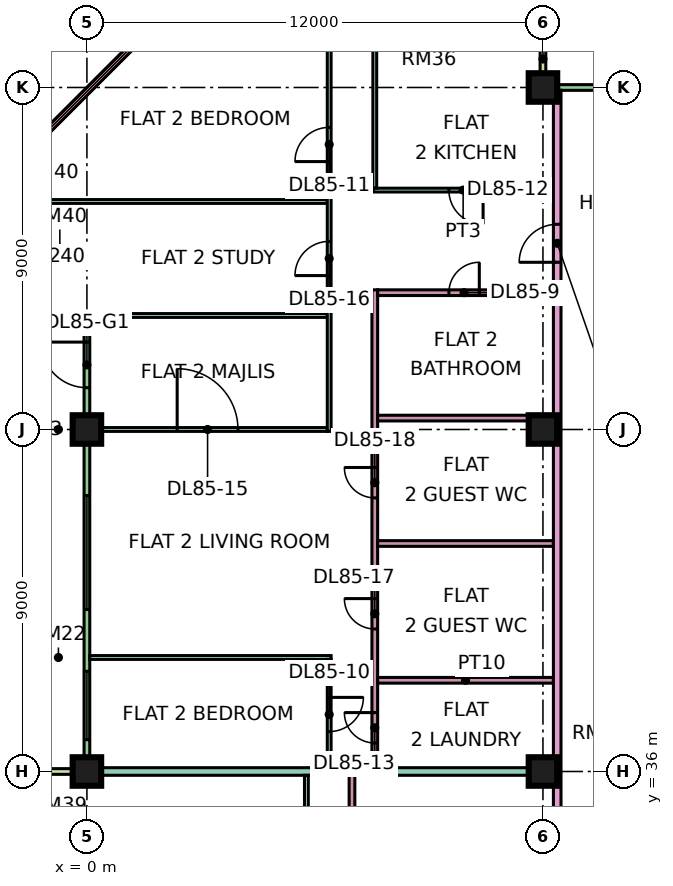
"""IFC4 building model, lengths in metres.
Left out: names, types, materials, properties, quantities, classifications, styles, units other than length and angle.
Written with IfcOpenShell. Run it as: python <this file> out.ifc"""

import sys

from ifc_helpers import new_model, si_unit, direction, frame, frame_2d, origin, origin_2d, place, context, subcontext, project, spatial, rectangle, extrude, element, fill, save


model = new_model("IFC4")
c1 = context("Model", 3, precision=1e-05, world=origin(), true_north=direction((0.0, 1.0)))
c2 = subcontext(c1, "Body", "Model", "MODEL_VIEW")
j1 = project(units=[si_unit("LENGTHUNIT", "METRE"), si_unit("PLANEANGLEUNIT", "RADIAN")], contexts=[c1])
p1 = place(None, origin())
s1 = spatial("IfcSite", under=j1, at=p1, CompositionType="ELEMENT")
p2 = place(p1, origin())
s2 = spatial("IfcBuilding", under=s1, at=p2, CompositionType="ELEMENT")
p3 = place(p2, frame((0.0, 0.0, 365.15)))
s3 = spatial("IfcBuildingStorey", under=s2, at=p3, CompositionType="ELEMENT", Elevation=365.15)
p4 = place(p3, frame((0.0, 36.0, 0.0), z_axis=(0.0, 0.0, 1.0), x_axis=(1.0, 0.0, 0.0)))
e1 = element("IfcColumn", 1, at=p4, inside=s3, PredefinedType="COLUMN", context=c2, shape_type="SweptSolid", body=[
    extrude(rectangle(XDim=0.75, YDim=0.75, at=origin_2d()), origin(), (0.0, 0.0, 1.0), 3.75),
])
for number, where, z_axis, x_axis in (
    (2, (0.0, 45.0, 0.0), (0.0, 0.0, 1.0), (1.0, 0.0, 0.0)),
    (3, (12.0, 36.0, 0.0), (0.0, 0.0, 1.0), (1.0, 0.0, 0.0)),
    (4, (12.0, 45.0, 0.0), (0.0, 0.0, 1.0), (1.0, 0.0, 0.0)),
    (5, (12.0, 54.0, 0.0), (0.0, 0.0, 1.0), (1.0, 0.0, 0.0)),
):
    element("IfcColumn", number, at=place(p3, frame(where, z_axis=z_axis, x_axis=x_axis)), inside=s3, PredefinedType="COLUMN", context=c2, shape_type="SweptSolid", body=[
        extrude(rectangle(XDim=0.75, YDim=0.75, at=origin_2d()), origin(), (0.0, 0.0, 1.0), 3.75),
    ])
p5 = place(p3, frame((22.425, 54.0, 0.0), z_axis=(0.0, 0.0, 1.0), x_axis=(-1.0, 0.0, 0.0)))
e6 = element("IfcWall", 6, at=p5, inside=s3, PredefinedType="SOLIDWALL", context=c2, shape_type="SweptSolid", body=[
    extrude(rectangle(XDim=10.35, YDim=0.15, at=frame_2d((5.175, 0.0))), origin(), (0.0, 0.0, 1.0), 3.35),
])
p6 = place(p5, frame((1.012, 0.0, 0.45)))
e7 = element("IfcOpeningElement", 7, at=p6, cuts=e6, PredefinedType="OPENING", context=c2, shape_type="SweptSolid", body=[
    extrude(rectangle(XDim=4.8, YDim=2.4, at=frame_2d((2.4, 1.2))), frame((0.0, 0.085, 0.0), z_axis=(0.0, -1.0, 0.0), x_axis=(1.0, 0.0, 0.0)), (0.0, 0.0, 1.0), 0.17),
])
p7 = place(p3, frame((12.0, 55.5, 0.0), z_axis=(0.0, 0.0, 1.0), x_axis=(0.0, -1.0, 0.0)))
e8 = element("IfcWall", 8, at=p7, inside=s3, PredefinedType="SOLIDWALL", context=c2, shape_type="SweptSolid", body=[
    extrude(rectangle(XDim=1.5, YDim=0.15, at=frame_2d((0.75, 0.0))), origin(), (0.0, 0.0, 1.0), 3.35),
])
p8 = place(p3, frame((1.553, 55.447, 0.0), z_axis=(0.0, 0.0, 1.0), x_axis=(-0.707106781187, -0.707106781187, 0.0)))
e9 = element("IfcWall", 9, at=p8, inside=s3, PredefinedType="SOLIDWALL", context=c2, shape_type="SweptSolid", body=[
    extrude(rectangle(XDim=4.243, YDim=0.15, at=frame_2d((2.121, 0.0))), origin(), (0.0, 0.0, 1.0), 3.35),
])
p9 = place(p8, frame((0.621, 0.0, 0.45)))
e10 = element("IfcOpeningElement", 10, at=p9, cuts=e9, PredefinedType="OPENING", context=c2, shape_type="SweptSolid", body=[
    extrude(rectangle(XDim=3.0, YDim=2.4, at=frame_2d((1.5, 1.2))), frame((0.0, 0.085, 0.0), z_axis=(0.0, -1.0, 0.0), x_axis=(1.0, 0.0, 0.0)), (0.0, 0.0, 1.0), 0.17),
])
p10 = place(p3, frame((0.0, 47.925, 0.0), z_axis=(0.0, 0.0, 1.0), x_axis=(0.0, -1.0, 0.0)))
e11 = element("IfcWall", 11, at=p10, inside=s3, PredefinedType="SOLIDWALL", context=c2, shape_type="SweptSolid", body=[
    extrude(rectangle(XDim=11.85, YDim=0.15, at=frame_2d((5.925, 0.0))), origin(), (0.0, 0.0, 1.0), 3.35),
])
p11 = place(p10, frame((0.625, 0.0, 0.0)))
e12 = element("IfcOpeningElement", 12, at=p11, cuts=e11, PredefinedType="OPENING", context=c2, shape_type="SweptSolid", body=[
    extrude(rectangle(XDim=1.2, YDim=2.4, at=frame_2d((0.6, 1.2))), frame((0.0, 0.085, 0.0), z_axis=(0.0, -1.0, 0.0), x_axis=(1.0, 0.0, 0.0)), (0.0, 0.0, 1.0), 0.17),
])
p12 = place(p10, frame((4.663, 0.0, 0.45)))
e13 = element("IfcOpeningElement", 13, at=p12, cuts=e11, PredefinedType="OPENING", context=c2, shape_type="SweptSolid", body=[
    extrude(rectangle(XDim=3.0, YDim=2.4, at=frame_2d((1.5, 1.2))), frame((0.0, 0.085, 0.0), z_axis=(0.0, -1.0, 0.0), x_axis=(1.0, 0.0, 0.0)), (0.0, 0.0, 1.0), 0.17),
])
p13 = place(p10, frame((9.288, 0.0, 0.45)))
e14 = element("IfcOpeningElement", 14, at=p13, cuts=e11, PredefinedType="OPENING", context=c2, shape_type="SweptSolid", body=[
    extrude(rectangle(XDim=1.8, YDim=2.4, at=frame_2d((0.9, 1.2))), frame((0.0, 0.085, 0.0), z_axis=(0.0, -1.0, 0.0), x_axis=(1.0, 0.0, 0.0)), (0.0, 0.0, 1.0), 0.17),
])
for number, where, z_axis, x_axis in (
    (15, (-1.5, 48.0, 0.0), (0.0, 0.0, 1.0), (1.0, 0.0, 0.0)),
    (16, (-1.5, 36.0, 0.0), (0.0, 0.0, 1.0), (1.0, 0.0, 0.0)),
):
    element("IfcWall", number, at=place(p3, frame(where, z_axis=z_axis, x_axis=x_axis)), inside=s3, PredefinedType="SOLIDWALL", context=c2, shape_type="SweptSolid", body=[
        extrude(rectangle(XDim=1.5, YDim=0.15, at=frame_2d((0.75, 0.0))), origin(), (0.0, 0.0, 1.0), 3.35),
    ])
e17 = element("IfcWall", 17, at=p4, inside=s3, PredefinedType="PARTITIONING", context=c2, shape_type="SweptSolid", body=[
    extrude(rectangle(XDim=12.275, YDim=0.2, at=frame_2d((6.137, 0.0))), origin(), (0.0, 0.0, 1.0), 3.35),
])
p14 = place(p3, frame((0.0, 48.0, 0.0), z_axis=(0.0, 0.0, 1.0), x_axis=(1.0, 0.0, 0.0)))
e18 = element("IfcWall", 18, at=p14, inside=s3, PredefinedType="PARTITIONING", context=c2, shape_type="SweptSolid", body=[
    extrude(rectangle(XDim=6.325, YDim=0.1, at=frame_2d((3.163, 0.0))), origin(), (0.0, 0.0, 1.0), 3.35),
])
p15 = place(p3, frame((-1.35, 51.0, 0.0), z_axis=(0.0, 0.0, 1.0), x_axis=(1.0, 0.0, 0.0)))
e19 = element("IfcWall", 19, at=p15, inside=s3, PredefinedType="PARTITIONING", context=c2, shape_type="SweptSolid", body=[
    extrude(rectangle(XDim=7.675, YDim=0.1, at=frame_2d((3.837, 0.0))), origin(), (0.0, 0.0, 1.0), 3.35),
])
p16 = place(p3, frame((0.074, 39.0, 0.0), z_axis=(0.0, 0.0, 1.0), x_axis=(1.0, 0.0, 0.0)))
e20 = element("IfcWall", 20, at=p16, inside=s3, PredefinedType="PARTITIONING", context=c2, shape_type="SweptSolid", body=[
    extrude(rectangle(XDim=6.351, YDim=0.1, at=frame_2d((3.176, 0.0))), origin(), (0.0, 0.0, 1.0), 3.35),
])
p17 = place(p3, frame((0.074, 45.0, 0.0), z_axis=(0.0, 0.0, 1.0), x_axis=(1.0, 0.0, 0.0)))
e21 = element("IfcWall", 21, at=p17, inside=s3, PredefinedType="PARTITIONING", context=c2, shape_type="SweptSolid", body=[
    extrude(rectangle(XDim=6.251, YDim=0.1, at=frame_2d((3.125, 0.0))), origin(), (0.0, 0.0, 1.0), 3.35),
])
p18 = place(p17, frame((2.301, 0.0, 0.0)))
e22 = element("IfcOpeningElement", 22, at=p18, cuts=e21, PredefinedType="OPENING", context=c2, shape_type="SweptSolid", body=[
    extrude(rectangle(XDim=1.6, YDim=2.1, at=frame_2d((0.8, 1.05))), frame((0.0, 0.06, 0.0), z_axis=(0.0, -1.0, 0.0), x_axis=(1.0, 0.0, 0.0)), (0.0, 0.0, 1.0), 0.12),
])
p19 = place(p3, frame((5.775, 29.95, 0.0), z_axis=(0.0, 0.0, 1.0), x_axis=(0.0, 1.0, 0.0)))
e23 = element("IfcWall", 23, at=p19, inside=s3, PredefinedType="PARTITIONING", context=c2, shape_type="SweptSolid", body=[
    extrude(rectangle(XDim=5.95, YDim=0.1, at=frame_2d((2.975, 0.0))), origin(), (0.0, 0.0, 1.0), 3.35),
])
p20 = place(p19, frame((1.1, 0.0, 0.0)))
e24 = element("IfcOpeningElement", 24, at=p20, cuts=e23, PredefinedType="OPENING", context=c2, shape_type="SweptSolid", body=[
    extrude(rectangle(XDim=0.9, YDim=2.1, at=frame_2d((0.45, 1.05))), frame((0.0, 0.06, 0.0), z_axis=(0.0, -1.0, 0.0), x_axis=(1.0, 0.0, 0.0)), (0.0, 0.0, 1.0), 0.12),
])
p21 = place(p19, frame((4.1, 0.0, 0.0)))
e25 = element("IfcOpeningElement", 25, at=p21, cuts=e23, PredefinedType="OPENING", context=c2, shape_type="SweptSolid", body=[
    extrude(rectangle(XDim=0.9, YDim=2.1, at=frame_2d((0.45, 1.05))), frame((0.0, 0.06, 0.0), z_axis=(0.0, -1.0, 0.0), x_axis=(1.0, 0.0, 0.0)), (0.0, 0.0, 1.0), 0.12),
])
p22 = place(p3, frame((6.375, 36.1, 0.0), z_axis=(0.0, 0.0, 1.0), x_axis=(0.0, 1.0, 0.0)))
e26 = element("IfcWall", 26, at=p22, inside=s3, PredefinedType="PARTITIONING", context=c2, shape_type="SweptSolid", body=[
    extrude(rectangle(XDim=2.85, YDim=0.1, at=frame_2d((1.425, 0.0))), origin(), (0.0, 0.0, 1.0), 3.35),
])
p23 = place(p22, frame((0.95, 0.0, 0.0)))
e27 = element("IfcOpeningElement", 27, at=p23, cuts=e26, PredefinedType="OPENING", context=c2, shape_type="SweptSolid", body=[
    extrude(rectangle(XDim=0.9, YDim=2.1, at=frame_2d((0.45, 1.05))), frame((0.0, 0.06, 0.0), z_axis=(0.0, -1.0, 0.0), x_axis=(1.0, 0.0, 0.0)), (0.0, 0.0, 1.0), 0.12),
])
p24 = place(p3, frame((6.375, 44.95, 0.0), z_axis=(0.0, 0.0, 1.0), x_axis=(0.0, 1.0, 0.0)))
e28 = element("IfcWall", 28, at=p24, inside=s3, PredefinedType="PARTITIONING", context=c2, shape_type="SweptSolid", body=[
    extrude(rectangle(XDim=10.4, YDim=0.1, at=frame_2d((5.2, 0.0))), origin(), (0.0, 0.0, 1.0), 3.35),
])
p25 = place(p24, frame((7.1, 0.0, 0.0)))
e29 = element("IfcOpeningElement", 29, at=p25, cuts=e28, PredefinedType="OPENING", context=c2, shape_type="SweptSolid", body=[
    extrude(rectangle(XDim=0.9, YDim=2.1, at=frame_2d((0.45, 1.05))), frame((0.0, 0.06, 0.0), z_axis=(0.0, -1.0, 0.0), x_axis=(1.0, 0.0, 0.0)), (0.0, 0.0, 1.0), 0.12),
])
p26 = place(p24, frame((4.1, 0.0, 0.0)))
e30 = element("IfcOpeningElement", 30, at=p26, cuts=e28, PredefinedType="OPENING", context=c2, shape_type="SweptSolid", body=[
    extrude(rectangle(XDim=0.9, YDim=2.1, at=frame_2d((0.45, 1.05))), frame((0.0, 0.06, 0.0), z_axis=(0.0, -1.0, 0.0), x_axis=(1.0, 0.0, 0.0)), (0.0, 0.0, 1.0), 0.12),
])
p27 = place(p3, frame((6.975, 26.325, 0.0), z_axis=(0.0, 0.0, 1.0), x_axis=(0.0, 1.0, 0.0)))
e31 = element("IfcWall", 31, at=p27, inside=s3, PredefinedType="PARTITIONING", context=c2, shape_type="SweptSolid", body=[
    extrude(rectangle(XDim=9.575, YDim=0.15, at=frame_2d((4.788, 0.0))), origin(), (0.0, 0.0, 1.0), 3.35),
])
p28 = place(p27, frame((1.125, 0.0, 0.0)))
e32 = element("IfcOpeningElement", 32, at=p28, cuts=e31, PredefinedType="OPENING", context=c2, shape_type="SweptSolid", body=[
    extrude(rectangle(XDim=0.8, YDim=2.1, at=frame_2d((0.4, 1.05))), frame((0.0, 0.085, 0.0), z_axis=(0.0, -1.0, 0.0), x_axis=(1.0, 0.0, 0.0)), (0.0, 0.0, 1.0), 0.17),
])
p29 = place(p27, frame((5.925, 0.0, 0.0)))
e33 = element("IfcOpeningElement", 33, at=p29, cuts=e31, PredefinedType="OPENING", context=c2, shape_type="SweptSolid", body=[
    extrude(rectangle(XDim=0.9, YDim=2.1, at=frame_2d((0.45, 1.05))), frame((0.0, 0.085, 0.0), z_axis=(0.0, -1.0, 0.0), x_axis=(1.0, 0.0, 0.0)), (0.0, 0.0, 1.0), 0.17),
])
p30 = place(p3, frame((7.525, 51.3, 0.0), z_axis=(0.0, 0.0, 1.0), x_axis=(1.0, 0.0, 0.0)))
e34 = element("IfcWall", 34, at=p30, inside=s3, PredefinedType="PARTITIONING", context=c2, shape_type="SweptSolid", body=[
    extrude(rectangle(XDim=4.75, YDim=0.1, at=frame_2d((2.375, 0.0))), origin(), (0.0, 0.0, 1.0), 3.35),
])
p31 = place(p30, frame((2.0, 0.0, 0.0)))
e35 = element("IfcOpeningElement", 35, at=p31, cuts=e34, PredefinedType="OPENING", context=c2, shape_type="SweptSolid", body=[
    extrude(rectangle(XDim=0.9, YDim=2.1, at=frame_2d((0.45, 1.05))), frame((0.0, 0.06, 0.0), z_axis=(0.0, -1.0, 0.0), x_axis=(1.0, 0.0, 0.0)), (0.0, 0.0, 1.0), 0.12),
])
p32 = place(p3, frame((7.575, 36.1, 0.0), z_axis=(0.0, 0.0, 1.0), x_axis=(0.0, 1.0, 0.0)))
e36 = element("IfcWall", 36, at=p32, inside=s3, PredefinedType="PARTITIONING", context=c2, shape_type="SweptSolid", body=[
    extrude(rectangle(XDim=12.575, YDim=0.15, at=frame_2d((6.288, 0.0))), origin(), (0.0, 0.0, 1.0), 3.35),
])
p33 = place(p32, frame((0.65, 0.0, 0.0)))
e37 = element("IfcOpeningElement", 37, at=p33, cuts=e36, PredefinedType="OPENING", context=c2, shape_type="SweptSolid", body=[
    extrude(rectangle(XDim=0.8, YDim=2.1, at=frame_2d((0.4, 1.05))), frame((0.0, 0.085, 0.0), z_axis=(0.0, -1.0, 0.0), x_axis=(1.0, 0.0, 0.0)), (0.0, 0.0, 1.0), 0.17),
])
p34 = place(p32, frame((3.65, 0.0, 0.0)))
e38 = element("IfcOpeningElement", 38, at=p34, cuts=e36, PredefinedType="OPENING", context=c2, shape_type="SweptSolid", body=[
    extrude(rectangle(XDim=0.8, YDim=2.1, at=frame_2d((0.4, 1.05))), frame((0.0, 0.085, 0.0), z_axis=(0.0, -1.0, 0.0), x_axis=(1.0, 0.0, 0.0)), (0.0, 0.0, 1.0), 0.17),
])
p35 = place(p32, frame((7.1, 0.0, 0.0)))
e39 = element("IfcOpeningElement", 39, at=p35, cuts=e36, PredefinedType="OPENING", context=c2, shape_type="SweptSolid", body=[
    extrude(rectangle(XDim=0.8, YDim=2.1, at=frame_2d((0.4, 1.05))), frame((0.0, 0.085, 0.0), z_axis=(0.0, -1.0, 0.0), x_axis=(1.0, 0.0, 0.0)), (0.0, 0.0, 1.0), 0.17),
])
p36 = place(p3, frame((7.575, 51.35, 0.0), z_axis=(0.0, 0.0, 1.0), x_axis=(0.0, 1.0, 0.0)))
e40 = element("IfcWall", 40, at=p36, inside=s3, PredefinedType="PARTITIONING", context=c2, shape_type="SweptSolid", body=[
    extrude(rectangle(XDim=4.0, YDim=0.1, at=frame_2d((2.0, 0.0))), origin(), (0.0, 0.0, 1.0), 3.35),
])
for number, where, z_axis, x_axis in (
    (41, (7.65, 38.4, 0.0), (0.0, 0.0, 1.0), (1.0, 0.0, 0.0)),
    (42, (7.65, 42.0, 0.0), (0.0, 0.0, 1.0), (1.0, 0.0, 0.0)),
    (43, (7.65, 45.3, 0.0), (0.0, 0.0, 1.0), (1.0, 0.0, 0.0)),
):
    element("IfcWall", number, at=place(p3, frame(where, z_axis=z_axis, x_axis=x_axis)), inside=s3, PredefinedType="PARTITIONING", context=c2, shape_type="SweptSolid", body=[
        extrude(rectangle(XDim=4.625, YDim=0.15, at=frame_2d((2.312, 0.0))), origin(), (0.0, 0.0, 1.0), 3.35),
    ])
p37 = place(p3, frame((7.65, 48.6, 0.0), z_axis=(0.0, 0.0, 1.0), x_axis=(1.0, 0.0, 0.0)))
e44 = element("IfcWall", 44, at=p37, inside=s3, PredefinedType="PARTITIONING", context=c2, shape_type="SweptSolid", body=[
    extrude(rectangle(XDim=4.625, YDim=0.15, at=frame_2d((2.312, 0.0))), origin(), (0.0, 0.0, 1.0), 3.35),
])
p38 = place(p37, frame((1.875, 0.0, 0.0)))
e45 = element("IfcOpeningElement", 45, at=p38, cuts=e44, PredefinedType="OPENING", context=c2, shape_type="SweptSolid", body=[
    extrude(rectangle(XDim=0.8, YDim=2.1, at=frame_2d((0.4, 1.05))), frame((0.0, 0.085, 0.0), z_axis=(0.0, -1.0, 0.0), x_axis=(1.0, 0.0, 0.0)), (0.0, 0.0, 1.0), 0.17),
])
p39 = place(p3, frame((12.375, 20.0, 0.0), z_axis=(0.0, 0.0, 1.0), x_axis=(0.0, 1.0, 0.0)))
e46 = element("IfcWall", 46, at=p39, inside=s3, PredefinedType="PARTITIONING", context=c2, shape_type="SweptSolid", body=[
    extrude(rectangle(XDim=33.926, YDim=0.2, at=frame_2d((16.963, 0.0))), origin(), (0.0, 0.0, 1.0), 3.35),
])
p40 = place(p39, frame((29.4, 0.0, 0.0)))
e47 = element("IfcOpeningElement", 47, at=p40, cuts=e46, PredefinedType="OPENING", context=c2, shape_type="SweptSolid", body=[
    extrude(rectangle(XDim=1.0, YDim=2.1, at=frame_2d((0.5, 1.05))), frame((0.0, 0.11, 0.0), z_axis=(0.0, -1.0, 0.0), x_axis=(1.0, 0.0, 0.0)), (0.0, 0.0, 1.0), 0.22),
])
p41 = place(p39, frame((0.6, 0.0, 0.0)))
e48 = element("IfcOpeningElement", 48, at=p41, cuts=e46, PredefinedType="OPENING", context=c2, shape_type="SweptSolid", body=[
    extrude(rectangle(XDim=1.2, YDim=2.1, at=frame_2d((0.6, 1.05))), frame((0.0, 0.11, 0.0), z_axis=(0.0, -1.0, 0.0), x_axis=(1.0, 0.0, 0.0)), (0.0, 0.0, 1.0), 0.22),
])
p42 = place(p39, frame((4.5, 0.0, 0.0)))
e49 = element("IfcOpeningElement", 49, at=p42, cuts=e46, PredefinedType="OPENING", context=c2, shape_type="SweptSolid", body=[
    extrude(rectangle(XDim=1.0, YDim=2.1, at=frame_2d((0.5, 1.05))), frame((0.0, 0.11, 0.0), z_axis=(0.0, -1.0, 0.0), x_axis=(1.0, 0.0, 0.0)), (0.0, 0.0, 1.0), 0.22),
])
p43 = place(p9, origin())
e50 = element("IfcWindow", 50, at=p43, inside=s3, PartitioningType="SINGLE_PANEL", PredefinedType="WINDOW", context=c2, shape_type="SweptSolid", body=[
    extrude(rectangle(XDim=3.0, YDim=2.4, at=frame_2d((1.5, 1.2))), frame((0.0, 0.03, 0.0), z_axis=(0.0, -1.0, 0.0), x_axis=(1.0, 0.0, 0.0)), (0.0, 0.0, 1.0), 0.06),
])
fill(e10, e50)
p44 = place(p11, frame((1.2, 0.0, 0.0), z_axis=(0.0, 0.0, 1.0), x_axis=(-1.0, 0.0, 0.0)))
e51 = element("IfcDoor", 51, at=p44, inside=s3, OperationType="DOUBLE_DOOR_SINGLE_SWING", PredefinedType="DOOR", context=c2, shape_type="SweptSolid", body=[
    extrude(rectangle(XDim=1.2, YDim=2.4, at=frame_2d((0.6, 1.2))), frame((0.0, 0.025, 0.0), z_axis=(0.0, -1.0, 0.0), x_axis=(1.0, 0.0, 0.0)), (0.0, 0.0, 1.0), 0.05),
])
fill(e12, e51)
p45 = place(p12, origin())
e52 = element("IfcWindow", 52, at=p45, inside=s3, PartitioningType="SINGLE_PANEL", PredefinedType="WINDOW", context=c2, shape_type="SweptSolid", body=[
    extrude(rectangle(XDim=3.0, YDim=2.4, at=frame_2d((1.5, 1.2))), frame((0.0, 0.03, 0.0), z_axis=(0.0, -1.0, 0.0), x_axis=(1.0, 0.0, 0.0)), (0.0, 0.0, 1.0), 0.06),
])
fill(e13, e52)
p46 = place(p13, origin())
e53 = element("IfcWindow", 53, at=p46, inside=s3, PartitioningType="SINGLE_PANEL", PredefinedType="WINDOW", context=c2, shape_type="SweptSolid", body=[
    extrude(rectangle(XDim=1.8, YDim=2.4, at=frame_2d((0.9, 1.2))), frame((0.0, 0.03, 0.0), z_axis=(0.0, -1.0, 0.0), x_axis=(1.0, 0.0, 0.0)), (0.0, 0.0, 1.0), 0.06),
])
fill(e14, e53)
p47 = place(p38, frame((0.8, 0.0, 0.0), z_axis=(0.0, 0.0, 1.0), x_axis=(-1.0, 0.0, 0.0)))
e54 = element("IfcDoor", 54, at=p47, inside=s3, OperationType="SINGLE_SWING_RIGHT", PredefinedType="DOOR", context=c2, shape_type="SweptSolid", body=[
    extrude(rectangle(XDim=0.8, YDim=2.1, at=frame_2d((0.4, 1.05))), frame((0.0, 0.025, 0.0), z_axis=(0.0, -1.0, 0.0), x_axis=(1.0, 0.0, 0.0)), (0.0, 0.0, 1.0), 0.05),
])
fill(e45, e54)
p48 = place(p23, origin())
e55 = element("IfcDoor", 55, at=p48, inside=s3, OperationType="SINGLE_SWING_RIGHT", PredefinedType="DOOR", context=c2, shape_type="SweptSolid", body=[
    extrude(rectangle(XDim=0.9, YDim=2.1, at=frame_2d((0.45, 1.05))), frame((0.0, 0.025, 0.0), z_axis=(0.0, -1.0, 0.0), x_axis=(1.0, 0.0, 0.0)), (0.0, 0.0, 1.0), 0.05),
])
fill(e27, e55)
p49 = place(p25, origin())
e56 = element("IfcDoor", 56, at=p49, inside=s3, OperationType="SINGLE_SWING_LEFT", PredefinedType="DOOR", context=c2, shape_type="SweptSolid", body=[
    extrude(rectangle(XDim=0.9, YDim=2.1, at=frame_2d((0.45, 1.05))), frame((0.0, 0.025, 0.0), z_axis=(0.0, -1.0, 0.0), x_axis=(1.0, 0.0, 0.0)), (0.0, 0.0, 1.0), 0.05),
])
fill(e29, e56)
p50 = place(p31, origin())
e57 = element("IfcDoor", 57, at=p50, inside=s3, OperationType="SINGLE_SWING_RIGHT", PredefinedType="DOOR", context=c2, shape_type="SweptSolid", body=[
    extrude(rectangle(XDim=0.9, YDim=2.1, at=frame_2d((0.45, 1.05))), frame((0.0, 0.025, 0.0), z_axis=(0.0, -1.0, 0.0), x_axis=(1.0, 0.0, 0.0)), (0.0, 0.0, 1.0), 0.05),
])
fill(e35, e57)
p51 = place(p33, frame((0.8, 0.0, 0.0), z_axis=(0.0, 0.0, 1.0), x_axis=(-1.0, 0.0, 0.0)))
e58 = element("IfcDoor", 58, at=p51, inside=s3, OperationType="SINGLE_SWING_RIGHT", PredefinedType="DOOR", context=c2, shape_type="SweptSolid", body=[
    extrude(rectangle(XDim=0.8, YDim=2.1, at=frame_2d((0.4, 1.05))), frame((0.0, 0.025, 0.0), z_axis=(0.0, -1.0, 0.0), x_axis=(1.0, 0.0, 0.0)), (0.0, 0.0, 1.0), 0.05),
])
fill(e37, e58)
p52 = place(p40, origin())
e59 = element("IfcDoor", 59, at=p52, inside=s3, OperationType="SINGLE_SWING_LEFT", PredefinedType="DOOR", context=c2, shape_type="SweptSolid", body=[
    extrude(rectangle(XDim=1.0, YDim=2.1, at=frame_2d((0.5, 1.05))), frame((0.0, 0.025, 0.0), z_axis=(0.0, -1.0, 0.0), x_axis=(1.0, 0.0, 0.0)), (0.0, 0.0, 1.0), 0.05),
])
fill(e47, e59)
p53 = place(p18, origin())
e60 = element("IfcDoor", 60, at=p53, inside=s3, OperationType="DOUBLE_DOOR_SINGLE_SWING", PredefinedType="DOOR", context=c2, shape_type="SweptSolid", body=[
    extrude(rectangle(XDim=1.6, YDim=2.1, at=frame_2d((0.8, 1.05))), frame((0.0, 0.025, 0.0), z_axis=(0.0, -1.0, 0.0), x_axis=(1.0, 0.0, 0.0)), (0.0, 0.0, 1.0), 0.05),
])
fill(e22, e60)
p54 = place(p26, origin())
e61 = element("IfcDoor", 61, at=p54, inside=s3, OperationType="SINGLE_SWING_LEFT", PredefinedType="DOOR", context=c2, shape_type="SweptSolid", body=[
    extrude(rectangle(XDim=0.9, YDim=2.1, at=frame_2d((0.45, 1.05))), frame((0.0, 0.025, 0.0), z_axis=(0.0, -1.0, 0.0), x_axis=(1.0, 0.0, 0.0)), (0.0, 0.0, 1.0), 0.05),
])
fill(e30, e61)
p55 = place(p34, frame((0.8, 0.0, 0.0), z_axis=(0.0, 0.0, 1.0), x_axis=(-1.0, 0.0, 0.0)))
e62 = element("IfcDoor", 62, at=p55, inside=s3, OperationType="SINGLE_SWING_RIGHT", PredefinedType="DOOR", context=c2, shape_type="SweptSolid", body=[
    extrude(rectangle(XDim=0.8, YDim=2.1, at=frame_2d((0.4, 1.05))), frame((0.0, 0.025, 0.0), z_axis=(0.0, -1.0, 0.0), x_axis=(1.0, 0.0, 0.0)), (0.0, 0.0, 1.0), 0.05),
])
fill(e38, e62)
p56 = place(p35, frame((0.8, 0.0, 0.0), z_axis=(0.0, 0.0, 1.0), x_axis=(-1.0, 0.0, 0.0)))
e63 = element("IfcDoor", 63, at=p56, inside=s3, OperationType="SINGLE_SWING_RIGHT", PredefinedType="DOOR", context=c2, shape_type="SweptSolid", body=[
    extrude(rectangle(XDim=0.8, YDim=2.1, at=frame_2d((0.4, 1.05))), frame((0.0, 0.025, 0.0), z_axis=(0.0, -1.0, 0.0), x_axis=(1.0, 0.0, 0.0)), (0.0, 0.0, 1.0), 0.05),
])
fill(e39, e63)
save(model, sys.argv[1])
